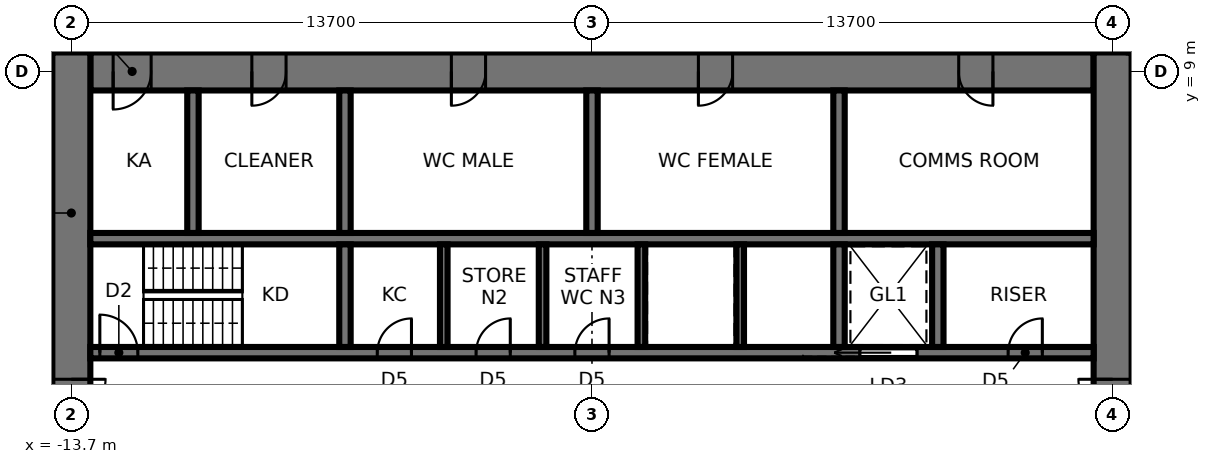
"""IFC4 building model, lengths in metres.
Left out: names, types, materials, properties, quantities, classifications, styles, units other than length and angle.
Written with IfcOpenShell. Run it as: python <this file> out.ifc"""

import sys

from ifc_helpers import new_model, si_unit, direction, frame, frame_2d, origin, place, context, subcontext, project, spatial, rectangle, extrude, element, fill, save


model = new_model("IFC4")
c1 = context("Model", 3, precision=1e-05, world=origin(), true_north=direction((0.0, 1.0)))
c2 = subcontext(c1, "Body", "Model", "MODEL_VIEW")
j1 = project(units=[si_unit("LENGTHUNIT", "METRE"), si_unit("PLANEANGLEUNIT", "RADIAN")], contexts=[c1])
p1 = place(None, origin())
s1 = spatial("IfcSite", under=j1, at=p1, CompositionType="ELEMENT")
p2 = place(p1, origin())
s2 = spatial("IfcBuilding", under=s1, at=p2, CompositionType="ELEMENT")
p3 = place(p2, frame((0.0, 0.0, 147.0)))
s3 = spatial("IfcBuildingStorey", under=s2, at=p3, CompositionType="ELEMENT", Elevation=147.0)
p4 = place(p3, frame((13.2, 9.0, 0.0), z_axis=(0.0, 0.0, 1.0), x_axis=(-1.0, 0.0, 0.0)))
e1 = element("IfcWall", 1, at=p4, inside=s3, PredefinedType="SHEAR", context=c2, shape_type="SweptSolid", body=[
    extrude(rectangle(XDim=26.4, YDim=1.0, at=frame_2d((13.2, 0.0))), origin(), (0.0, 0.0, 1.0), 3.9),
])
p5 = place(p4, frame((2.65, 0.0, 0.0)))
e2 = element("IfcOpeningElement", 2, at=p5, cuts=e1, PredefinedType="OPENING", context=c2, shape_type="SweptSolid", body=[
    extrude(rectangle(XDim=0.9, YDim=2.1, at=frame_2d((0.45, 1.05))), frame((0.0, 0.51, 0.0), z_axis=(0.0, -1.0, 0.0), x_axis=(1.0, 0.0, 0.0)), (0.0, 0.0, 1.0), 1.02),
])
p6 = place(p4, frame((9.5, 0.0, 0.0)))
e3 = element("IfcOpeningElement", 3, at=p6, cuts=e1, PredefinedType="OPENING", context=c2, shape_type="SweptSolid", body=[
    extrude(rectangle(XDim=0.9, YDim=2.1, at=frame_2d((0.45, 1.05))), frame((0.0, 0.51, 0.0), z_axis=(0.0, -1.0, 0.0), x_axis=(1.0, 0.0, 0.0)), (0.0, 0.0, 1.0), 1.02),
])
p7 = place(p4, frame((16.0, 0.0, 0.0)))
e4 = element("IfcOpeningElement", 4, at=p7, cuts=e1, PredefinedType="OPENING", context=c2, shape_type="SweptSolid", body=[
    extrude(rectangle(XDim=0.9, YDim=2.1, at=frame_2d((0.45, 1.05))), frame((0.0, 0.51, 0.0), z_axis=(0.0, -1.0, 0.0), x_axis=(1.0, 0.0, 0.0)), (0.0, 0.0, 1.0), 1.02),
])
p8 = place(p4, frame((21.25, 0.0, 0.0)))
e5 = element("IfcOpeningElement", 5, at=p8, cuts=e1, PredefinedType="OPENING", context=c2, shape_type="SweptSolid", body=[
    extrude(rectangle(XDim=0.9, YDim=2.1, at=frame_2d((0.45, 1.05))), frame((0.0, 0.51, 0.0), z_axis=(0.0, -1.0, 0.0), x_axis=(1.0, 0.0, 0.0)), (0.0, 0.0, 1.0), 1.02),
])
p9 = place(p4, frame((24.8, 0.0, 0.0)))
e6 = element("IfcOpeningElement", 6, at=p9, cuts=e1, PredefinedType="OPENING", context=c2, shape_type="SweptSolid", body=[
    extrude(rectangle(XDim=1.0, YDim=2.1, at=frame_2d((0.5, 1.05))), frame((0.0, 0.51, 0.0), z_axis=(0.0, -1.0, 0.0), x_axis=(1.0, 0.0, 0.0)), (0.0, 0.0, 1.0), 1.02),
])
p10 = place(p3, frame((13.7, -9.5, 0.0), z_axis=(0.0, 0.0, 1.0), x_axis=(0.0, 1.0, 0.0)))
e7 = element("IfcWall", 7, at=p10, inside=s3, PredefinedType="SHEAR", context=c2, shape_type="SweptSolid", body=[
    extrude(rectangle(XDim=19.0, YDim=1.0, at=frame_2d((9.5, 0.0))), origin(), (0.0, 0.0, 1.0), 3.9),
])
p11 = place(p10, frame((8.6, 0.0, 0.0)))
e8 = element("IfcOpeningElement", 8, at=p11, cuts=e7, PredefinedType="OPENING", context=c2, shape_type="SweptSolid", body=[
    extrude(rectangle(XDim=1.8, YDim=2.4, at=frame_2d((0.9, 1.2))), frame((0.0, 0.51, 0.0), z_axis=(0.0, -1.0, 0.0), x_axis=(1.0, 0.0, 0.0)), (0.0, 0.0, 1.0), 1.02),
])
p12 = place(p3, frame((-13.7, 9.5, 0.0), z_axis=(0.0, 0.0, 1.0), x_axis=(0.0, -1.0, 0.0)))
e9 = element("IfcWall", 9, at=p12, inside=s3, PredefinedType="SHEAR", context=c2, shape_type="SweptSolid", body=[
    extrude(rectangle(XDim=19.0, YDim=1.0, at=frame_2d((9.5, 0.0))), origin(), (0.0, 0.0, 1.0), 3.9),
])
p13 = place(p12, frame((8.6, 0.0, 0.0)))
e10 = element("IfcOpeningElement", 10, at=p13, cuts=e9, PredefinedType="OPENING", context=c2, shape_type="SweptSolid", body=[
    extrude(rectangle(XDim=1.8, YDim=2.4, at=frame_2d((0.9, 1.2))), frame((0.0, 0.51, 0.0), z_axis=(0.0, -1.0, 0.0), x_axis=(1.0, 0.0, 0.0)), (0.0, 0.0, 1.0), 1.02),
])
p14 = place(p3, frame((-13.2, 1.6, 0.0), z_axis=(0.0, 0.0, 1.0), x_axis=(1.0, 0.0, 0.0)))
e11 = element("IfcWall", 11, at=p14, inside=s3, PredefinedType="SHEAR", context=c2, shape_type="SweptSolid", body=[
    extrude(rectangle(XDim=26.4, YDim=0.3, at=frame_2d((13.2, 0.0))), origin(), (0.0, 0.0, 1.0), 3.9),
])
p15 = place(p14, frame((0.25, 0.0, 0.0)))
e12 = element("IfcOpeningElement", 12, at=p15, cuts=e11, PredefinedType="OPENING", context=c2, shape_type="SweptSolid", body=[
    extrude(rectangle(XDim=1.0, YDim=2.1, at=frame_2d((0.5, 1.05))), frame((0.0, 0.16, 0.0), z_axis=(0.0, -1.0, 0.0), x_axis=(1.0, 0.0, 0.0)), (0.0, 0.0, 1.0), 0.32),
])
p16 = place(p14, frame((20.25, 0.0, 0.0)))
e13 = element("IfcOpeningElement", 13, at=p16, cuts=e11, PredefinedType="OPENING", context=c2, shape_type="SweptSolid", body=[
    extrude(rectangle(XDim=1.5, YDim=2.4, at=frame_2d((0.75, 1.2))), frame((0.0, 0.16, 0.0), z_axis=(0.0, -1.0, 0.0), x_axis=(1.0, 0.0, 0.0)), (0.0, 0.0, 1.0), 0.32),
])
p17 = place(p14, frame((7.55, 0.0, 0.0)))
e14 = element("IfcOpeningElement", 14, at=p17, cuts=e11, PredefinedType="OPENING", context=c2, shape_type="SweptSolid", body=[
    extrude(rectangle(XDim=0.9, YDim=2.1, at=frame_2d((0.45, 1.05))), frame((0.0, 0.16, 0.0), z_axis=(0.0, -1.0, 0.0), x_axis=(1.0, 0.0, 0.0)), (0.0, 0.0, 1.0), 0.32),
])
p18 = place(p14, frame((10.15, 0.0, 0.0)))
e15 = element("IfcOpeningElement", 15, at=p18, cuts=e11, PredefinedType="OPENING", context=c2, shape_type="SweptSolid", body=[
    extrude(rectangle(XDim=0.9, YDim=2.1, at=frame_2d((0.45, 1.05))), frame((0.0, 0.16, 0.0), z_axis=(0.0, -1.0, 0.0), x_axis=(1.0, 0.0, 0.0)), (0.0, 0.0, 1.0), 0.32),
])
p19 = place(p14, frame((12.75, 0.0, 0.0)))
e16 = element("IfcOpeningElement", 16, at=p19, cuts=e11, PredefinedType="OPENING", context=c2, shape_type="SweptSolid", body=[
    extrude(rectangle(XDim=0.9, YDim=2.1, at=frame_2d((0.45, 1.05))), frame((0.0, 0.16, 0.0), z_axis=(0.0, -1.0, 0.0), x_axis=(1.0, 0.0, 0.0)), (0.0, 0.0, 1.0), 0.32),
])
p20 = place(p14, frame((24.15, 0.0, 0.0)))
e17 = element("IfcOpeningElement", 17, at=p20, cuts=e11, PredefinedType="OPENING", context=c2, shape_type="SweptSolid", body=[
    extrude(rectangle(XDim=0.9, YDim=2.1, at=frame_2d((0.45, 1.05))), frame((0.0, 0.16, 0.0), z_axis=(0.0, -1.0, 0.0), x_axis=(1.0, 0.0, 0.0)), (0.0, 0.0, 1.0), 0.32),
])
p21 = place(p3, frame((-13.2, 4.6, 0.0), z_axis=(0.0, 0.0, 1.0), x_axis=(1.0, 0.0, 0.0)))
e18 = element("IfcWall", 18, at=p21, inside=s3, PredefinedType="SHEAR", context=c2, shape_type="SweptSolid", body=[
    extrude(rectangle(XDim=26.4, YDim=0.3, at=frame_2d((13.2, 0.0))), origin(), (0.0, 0.0, 1.0), 3.9),
])
p22 = place(p3, frame((-6.5, 1.75, 0.0), z_axis=(0.0, 0.0, 1.0), x_axis=(0.0, 1.0, 0.0)))
e19 = element("IfcWall", 19, at=p22, inside=s3, PredefinedType="SHEAR", context=c2, shape_type="SweptSolid", body=[
    extrude(rectangle(XDim=2.7, YDim=0.3, at=frame_2d((1.35, 0.0))), origin(), (0.0, 0.0, 1.0), 3.9),
])
p23 = place(p3, frame((-6.5, 4.75, 0.0), z_axis=(0.0, 0.0, 1.0), x_axis=(0.0, 1.0, 0.0)))
e20 = element("IfcWall", 20, at=p23, inside=s3, PredefinedType="SHEAR", context=c2, shape_type="SweptSolid", body=[
    extrude(rectangle(XDim=3.75, YDim=0.3, at=frame_2d((1.875, 0.0))), origin(), (0.0, 0.0, 1.0), 3.9),
])
p24 = place(p3, frame((6.5, 1.75, 0.0), z_axis=(0.0, 0.0, 1.0), x_axis=(0.0, 1.0, 0.0)))
e21 = element("IfcWall", 21, at=p24, inside=s3, PredefinedType="SHEAR", context=c2, shape_type="SweptSolid", body=[
    extrude(rectangle(XDim=2.7, YDim=0.3, at=frame_2d((1.35, 0.0))), origin(), (0.0, 0.0, 1.0), 3.9),
])
p25 = place(p3, frame((6.5, 4.75, 0.0), z_axis=(0.0, 0.0, 1.0), x_axis=(0.0, 1.0, 0.0)))
e22 = element("IfcWall", 22, at=p25, inside=s3, PredefinedType="SHEAR", context=c2, shape_type="SweptSolid", body=[
    extrude(rectangle(XDim=3.75, YDim=0.3, at=frame_2d((1.875, 0.0))), origin(), (0.0, 0.0, 1.0), 3.9),
])
for number, where, z_axis, x_axis in (
    (23, (-3.9, 1.75, 0.0), (0.0, 0.0, 1.0), (0.0, 1.0, 0.0)),
    (24, (-1.3, 1.75, 0.0), (0.0, 0.0, 1.0), (0.0, 1.0, 0.0)),
    (25, (1.3, 1.75, 0.0), (0.0, 0.0, 1.0), (0.0, 1.0, 0.0)),
    (26, (3.9, 1.75, 0.0), (0.0, 0.0, 1.0), (0.0, 1.0, 0.0)),
):
    element("IfcWall", number, at=place(p3, frame(where, z_axis=z_axis, x_axis=x_axis)), inside=s3, PredefinedType="SHEAR", context=c2, shape_type="SweptSolid", body=[
        extrude(rectangle(XDim=2.7, YDim=0.2, at=frame_2d((1.35, 0.0))), origin(), (0.0, 0.0, 1.0), 3.9),
    ])
for number, where, z_axis, x_axis in (
    (27, (0.0, 4.75, 0.0), (0.0, 0.0, 1.0), (0.0, 1.0, 0.0)),
    (28, (-10.5, 4.75, 0.0), (0.0, 0.0, 1.0), (0.0, 1.0, 0.0)),
):
    element("IfcWall", number, at=place(p3, frame(where, z_axis=z_axis, x_axis=x_axis)), inside=s3, PredefinedType="SHEAR", context=c2, shape_type="SweptSolid", body=[
        extrude(rectangle(XDim=3.75, YDim=0.3, at=frame_2d((1.875, 0.0))), origin(), (0.0, 0.0, 1.0), 3.9),
    ])
p26 = place(p3, frame((9.1, 1.75, 0.0), z_axis=(0.0, 0.0, 1.0), x_axis=(0.0, 1.0, 0.0)))
e29 = element("IfcWall", 29, at=p26, inside=s3, PredefinedType="SHEAR", context=c2, shape_type="SweptSolid", body=[
    extrude(rectangle(XDim=2.7, YDim=0.3, at=frame_2d((1.35, 0.0))), origin(), (0.0, 0.0, 1.0), 3.9),
])
p27 = place(p3, frame((14.2, 9.5, 0.0), z_axis=(0.0, 0.0, 1.0), x_axis=(0.0, 1.0, 0.0)))
e30 = element("IfcWall", 30, at=p27, inside=s3, PredefinedType="PARTITIONING", context=c2, shape_type="SweptSolid", body=[
    extrude(rectangle(XDim=1.8, YDim=0.15, at=frame_2d((0.9, 0.0))), origin(), (0.0, 0.0, 1.0), 3.74),
])
p28 = place(p13, origin())
e31 = element("IfcDoor", 31, at=p28, inside=s3, OperationType="DOUBLE_DOOR_SINGLE_SWING", PredefinedType="DOOR", context=c2, shape_type="SweptSolid", body=[
    extrude(rectangle(XDim=1.72, YDim=2.36, at=frame_2d((0.9, 1.18))), frame((0.0, 0.025, 0.0), z_axis=(0.0, -1.0, 0.0), x_axis=(1.0, 0.0, 0.0)), (0.0, 0.0, 1.0), 0.05),
    extrude(rectangle(XDim=0.04, YDim=2.4, at=frame_2d((0.02, 1.2))), frame((0.0, 0.25, 0.0), z_axis=(0.0, -1.0, 0.0), x_axis=(1.0, 0.0, 0.0)), (0.0, 0.0, 1.0), 0.5),
    extrude(rectangle(XDim=0.04, YDim=2.4, at=frame_2d((1.78, 1.2))), frame((0.0, 0.25, 0.0), z_axis=(0.0, -1.0, 0.0), x_axis=(1.0, 0.0, 0.0)), (0.0, 0.0, 1.0), 0.5),
    extrude(rectangle(XDim=1.72, YDim=0.04, at=frame_2d((0.9, 2.38))), frame((0.0, 0.25, 0.0), z_axis=(0.0, -1.0, 0.0), x_axis=(1.0, 0.0, 0.0)), (0.0, 0.0, 1.0), 0.5),
])
fill(e10, e31)
p29 = place(p11, origin())
e32 = element("IfcDoor", 32, at=p29, inside=s3, OperationType="DOUBLE_DOOR_SINGLE_SWING", PredefinedType="DOOR", context=c2, shape_type="SweptSolid", body=[
    extrude(rectangle(XDim=1.72, YDim=2.36, at=frame_2d((0.9, 1.18))), frame((0.0, 0.025, 0.0), z_axis=(0.0, -1.0, 0.0), x_axis=(1.0, 0.0, 0.0)), (0.0, 0.0, 1.0), 0.05),
    extrude(rectangle(XDim=0.04, YDim=2.4, at=frame_2d((0.02, 1.2))), frame((0.0, 0.25, 0.0), z_axis=(0.0, -1.0, 0.0), x_axis=(1.0, 0.0, 0.0)), (0.0, 0.0, 1.0), 0.5),
    extrude(rectangle(XDim=0.04, YDim=2.4, at=frame_2d((1.78, 1.2))), frame((0.0, 0.25, 0.0), z_axis=(0.0, -1.0, 0.0), x_axis=(1.0, 0.0, 0.0)), (0.0, 0.0, 1.0), 0.5),
    extrude(rectangle(XDim=1.72, YDim=0.04, at=frame_2d((0.9, 2.38))), frame((0.0, 0.25, 0.0), z_axis=(0.0, -1.0, 0.0), x_axis=(1.0, 0.0, 0.0)), (0.0, 0.0, 1.0), 0.5),
])
fill(e8, e32)
p30 = place(p15, origin())
e33 = element("IfcDoor", 33, at=p30, inside=s3, OperationType="SINGLE_SWING_LEFT", PredefinedType="DOOR", context=c2, shape_type="SweptSolid", body=[
    extrude(rectangle(XDim=1.0, YDim=2.1, at=frame_2d((0.5, 1.05))), frame((0.0, 0.025, 0.0), z_axis=(0.0, -1.0, 0.0), x_axis=(1.0, 0.0, 0.0)), (0.0, 0.0, 1.0), 0.05),
])
fill(e12, e33)
p31 = place(p16, origin())
e34 = element("IfcDoor", 34, at=p31, inside=s3, OperationType="SLIDING_TO_LEFT", PredefinedType="DOOR", context=c2, shape_type="SweptSolid", body=[
    extrude(rectangle(XDim=1.5, YDim=2.4, at=frame_2d((0.75, 1.2))), frame((0.0, 0.025, 0.0), z_axis=(0.0, -1.0, 0.0), x_axis=(1.0, 0.0, 0.0)), (0.0, 0.0, 1.0), 0.05),
])
fill(e13, e34)
p32 = place(p17, origin())
e35 = element("IfcDoor", 35, at=p32, inside=s3, OperationType="SINGLE_SWING_RIGHT", PredefinedType="DOOR", context=c2, shape_type="SweptSolid", body=[
    extrude(rectangle(XDim=0.9, YDim=2.1, at=frame_2d((0.45, 1.05))), frame((0.0, 0.025, 0.0), z_axis=(0.0, -1.0, 0.0), x_axis=(1.0, 0.0, 0.0)), (0.0, 0.0, 1.0), 0.05),
])
fill(e14, e35)
p33 = place(p18, origin())
e36 = element("IfcDoor", 36, at=p33, inside=s3, OperationType="SINGLE_SWING_RIGHT", PredefinedType="DOOR", context=c2, shape_type="SweptSolid", body=[
    extrude(rectangle(XDim=0.9, YDim=2.1, at=frame_2d((0.45, 1.05))), frame((0.0, 0.025, 0.0), z_axis=(0.0, -1.0, 0.0), x_axis=(1.0, 0.0, 0.0)), (0.0, 0.0, 1.0), 0.05),
])
fill(e15, e36)
p34 = place(p19, origin())
e37 = element("IfcDoor", 37, at=p34, inside=s3, OperationType="SINGLE_SWING_RIGHT", PredefinedType="DOOR", context=c2, shape_type="SweptSolid", body=[
    extrude(rectangle(XDim=0.9, YDim=2.1, at=frame_2d((0.45, 1.05))), frame((0.0, 0.025, 0.0), z_axis=(0.0, -1.0, 0.0), x_axis=(1.0, 0.0, 0.0)), (0.0, 0.0, 1.0), 0.05),
])
fill(e16, e37)
p35 = place(p20, origin())
e38 = element("IfcDoor", 38, at=p35, inside=s3, OperationType="SINGLE_SWING_RIGHT", PredefinedType="DOOR", context=c2, shape_type="SweptSolid", body=[
    extrude(rectangle(XDim=0.9, YDim=2.1, at=frame_2d((0.45, 1.05))), frame((0.0, 0.025, 0.0), z_axis=(0.0, -1.0, 0.0), x_axis=(1.0, 0.0, 0.0)), (0.0, 0.0, 1.0), 0.05),
])
fill(e17, e38)
p36 = place(p5, origin())
e39 = element("IfcDoor", 39, at=p36, inside=s3, OperationType="SINGLE_SWING_LEFT", PredefinedType="DOOR", context=c2, shape_type="SweptSolid", body=[
    extrude(rectangle(XDim=0.82, YDim=2.06, at=frame_2d((0.45, 1.03))), frame((0.0, 0.025, 0.0), z_axis=(0.0, -1.0, 0.0), x_axis=(1.0, 0.0, 0.0)), (0.0, 0.0, 1.0), 0.05),
    extrude(rectangle(XDim=0.04, YDim=2.1, at=frame_2d((0.02, 1.05))), frame((0.0, 0.25, 0.0), z_axis=(0.0, -1.0, 0.0), x_axis=(1.0, 0.0, 0.0)), (0.0, 0.0, 1.0), 0.5),
    extrude(rectangle(XDim=0.04, YDim=2.1, at=frame_2d((0.88, 1.05))), frame((0.0, 0.25, 0.0), z_axis=(0.0, -1.0, 0.0), x_axis=(1.0, 0.0, 0.0)), (0.0, 0.0, 1.0), 0.5),
    extrude(rectangle(XDim=0.82, YDim=0.04, at=frame_2d((0.45, 2.08))), frame((0.0, 0.25, 0.0), z_axis=(0.0, -1.0, 0.0), x_axis=(1.0, 0.0, 0.0)), (0.0, 0.0, 1.0), 0.5),
])
fill(e2, e39)
p37 = place(p6, origin())
e40 = element("IfcDoor", 40, at=p37, inside=s3, OperationType="SINGLE_SWING_RIGHT", PredefinedType="DOOR", context=c2, shape_type="SweptSolid", body=[
    extrude(rectangle(XDim=0.82, YDim=2.06, at=frame_2d((0.45, 1.03))), frame((0.0, 0.025, 0.0), z_axis=(0.0, -1.0, 0.0), x_axis=(1.0, 0.0, 0.0)), (0.0, 0.0, 1.0), 0.05),
    extrude(rectangle(XDim=0.04, YDim=2.1, at=frame_2d((0.02, 1.05))), frame((0.0, 0.25, 0.0), z_axis=(0.0, -1.0, 0.0), x_axis=(1.0, 0.0, 0.0)), (0.0, 0.0, 1.0), 0.5),
    extrude(rectangle(XDim=0.04, YDim=2.1, at=frame_2d((0.88, 1.05))), frame((0.0, 0.25, 0.0), z_axis=(0.0, -1.0, 0.0), x_axis=(1.0, 0.0, 0.0)), (0.0, 0.0, 1.0), 0.5),
    extrude(rectangle(XDim=0.82, YDim=0.04, at=frame_2d((0.45, 2.08))), frame((0.0, 0.25, 0.0), z_axis=(0.0, -1.0, 0.0), x_axis=(1.0, 0.0, 0.0)), (0.0, 0.0, 1.0), 0.5),
])
fill(e3, e40)
p38 = place(p7, origin())
e41 = element("IfcDoor", 41, at=p38, inside=s3, OperationType="SINGLE_SWING_RIGHT", PredefinedType="DOOR", context=c2, shape_type="SweptSolid", body=[
    extrude(rectangle(XDim=0.82, YDim=2.06, at=frame_2d((0.45, 1.03))), frame((0.0, 0.025, 0.0), z_axis=(0.0, -1.0, 0.0), x_axis=(1.0, 0.0, 0.0)), (0.0, 0.0, 1.0), 0.05),
    extrude(rectangle(XDim=0.04, YDim=2.1, at=frame_2d((0.02, 1.05))), frame((0.0, 0.25, 0.0), z_axis=(0.0, -1.0, 0.0), x_axis=(1.0, 0.0, 0.0)), (0.0, 0.0, 1.0), 0.5),
    extrude(rectangle(XDim=0.04, YDim=2.1, at=frame_2d((0.88, 1.05))), frame((0.0, 0.25, 0.0), z_axis=(0.0, -1.0, 0.0), x_axis=(1.0, 0.0, 0.0)), (0.0, 0.0, 1.0), 0.5),
    extrude(rectangle(XDim=0.82, YDim=0.04, at=frame_2d((0.45, 2.08))), frame((0.0, 0.25, 0.0), z_axis=(0.0, -1.0, 0.0), x_axis=(1.0, 0.0, 0.0)), (0.0, 0.0, 1.0), 0.5),
])
fill(e4, e41)
p39 = place(p8, origin())
e42 = element("IfcDoor", 42, at=p39, inside=s3, OperationType="SINGLE_SWING_RIGHT", PredefinedType="DOOR", context=c2, shape_type="SweptSolid", body=[
    extrude(rectangle(XDim=0.82, YDim=2.06, at=frame_2d((0.45, 1.03))), frame((0.0, 0.025, 0.0), z_axis=(0.0, -1.0, 0.0), x_axis=(1.0, 0.0, 0.0)), (0.0, 0.0, 1.0), 0.05),
    extrude(rectangle(XDim=0.04, YDim=2.1, at=frame_2d((0.02, 1.05))), frame((0.0, 0.25, 0.0), z_axis=(0.0, -1.0, 0.0), x_axis=(1.0, 0.0, 0.0)), (0.0, 0.0, 1.0), 0.5),
    extrude(rectangle(XDim=0.04, YDim=2.1, at=frame_2d((0.88, 1.05))), frame((0.0, 0.25, 0.0), z_axis=(0.0, -1.0, 0.0), x_axis=(1.0, 0.0, 0.0)), (0.0, 0.0, 1.0), 0.5),
    extrude(rectangle(XDim=0.82, YDim=0.04, at=frame_2d((0.45, 2.08))), frame((0.0, 0.25, 0.0), z_axis=(0.0, -1.0, 0.0), x_axis=(1.0, 0.0, 0.0)), (0.0, 0.0, 1.0), 0.5),
])
fill(e5, e42)
p40 = place(p9, origin())
e43 = element("IfcDoor", 43, at=p40, inside=s3, OperationType="SINGLE_SWING_RIGHT", PredefinedType="DOOR", context=c2, shape_type="SweptSolid", body=[
    extrude(rectangle(XDim=0.92, YDim=2.06, at=frame_2d((0.5, 1.03))), frame((0.0, 0.025, 0.0), z_axis=(0.0, -1.0, 0.0), x_axis=(1.0, 0.0, 0.0)), (0.0, 0.0, 1.0), 0.05),
    extrude(rectangle(XDim=0.04, YDim=2.1, at=frame_2d((0.02, 1.05))), frame((0.0, 0.25, 0.0), z_axis=(0.0, -1.0, 0.0), x_axis=(1.0, 0.0, 0.0)), (0.0, 0.0, 1.0), 0.5),
    extrude(rectangle(XDim=0.04, YDim=2.1, at=frame_2d((0.98, 1.05))), frame((0.0, 0.25, 0.0), z_axis=(0.0, -1.0, 0.0), x_axis=(1.0, 0.0, 0.0)), (0.0, 0.0, 1.0), 0.5),
    extrude(rectangle(XDim=0.92, YDim=0.04, at=frame_2d((0.5, 2.08))), frame((0.0, 0.25, 0.0), z_axis=(0.0, -1.0, 0.0), x_axis=(1.0, 0.0, 0.0)), (0.0, 0.0, 1.0), 0.5),
])
fill(e6, e43)
save(model, sys.argv[1])
